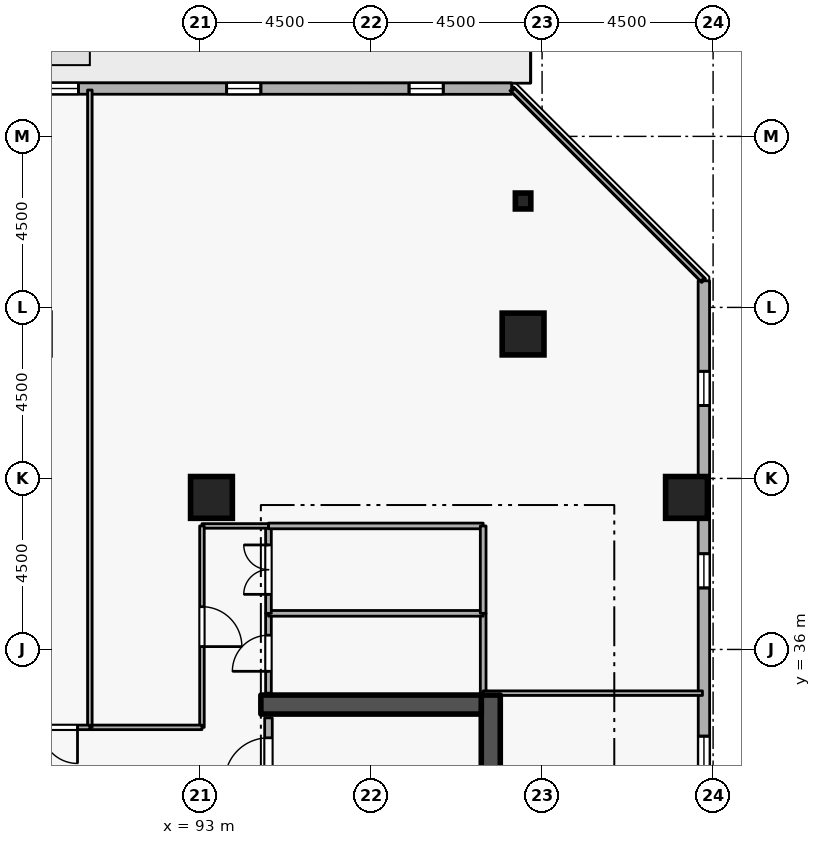
"""IFC4 building model, lengths in metres.
Left out: names, types, materials, properties, quantities, classifications, styles, units other than length and angle.
Written with IfcOpenShell. Run it as: python <this file> out.ifc"""

import sys

from ifc_helpers import new_model, si_unit, direction, frame, frame_2d, origin, origin_2d, place, context, subcontext, project, spatial, rectangle, i_section, extrude, element, fill, save


model = new_model("IFC4")
c1 = context("Model", 3, precision=1e-05, world=origin(), true_north=direction((0.0, 1.0)))
c2 = subcontext(c1, "Body", "Model", "MODEL_VIEW")
j1 = project(units=[si_unit("LENGTHUNIT", "METRE"), si_unit("PLANEANGLEUNIT", "RADIAN")], contexts=[c1])
p1 = place(None, origin())
s1 = spatial("IfcSite", under=j1, at=p1, CompositionType="ELEMENT")
p2 = place(p1, origin())
s2 = spatial("IfcBuilding", under=s1, at=p2, CompositionType="ELEMENT")
p3 = place(p2, frame((0.0, 0.0, 189.3)))
s3 = spatial("IfcBuildingStorey", under=s2, at=p3, CompositionType="ELEMENT", Elevation=189.3)
p4 = place(p3, frame((100.65, 19.2, 0.0), z_axis=(0.0, 0.0, 1.0), x_axis=(0.0, 1.0, 0.0)))
e1 = element("IfcWall", 1, at=p4, inside=s3, PredefinedType="SHEAR", context=c2, shape_type="SweptSolid", body=[
    extrude(rectangle(XDim=15.6, YDim=0.5, at=frame_2d((7.8, 0.0))), origin(), (0.0, 0.0, 1.0), 3.6),
])
p5 = place(p3, frame((94.6, 34.55, 0.0), z_axis=(0.0, 0.0, 1.0), x_axis=(1.0, 0.0, 0.0)))
e2 = element("IfcWall", 2, at=p5, inside=s3, PredefinedType="SHEAR", context=c2, shape_type="SweptSolid", body=[
    extrude(rectangle(XDim=5.8, YDim=0.5, at=frame_2d((2.9, 0.0))), origin(), (0.0, 0.0, 1.0), 3.6),
])
for number, where, z_axis, x_axis in (
    (3, (105.8, 40.0, 0.0), (0.0, 0.0, 1.0), (1.0, 0.0, 0.0)),
    (4, (101.5, 44.3, 0.0), (0.0, 0.0, 1.0), (1.0, 0.0, 0.0)),
    (5, (93.3, 40.0, 0.0), (0.0, 0.0, 1.0), (1.0, 0.0, 0.0)),
):
    element("IfcColumn", number, at=place(p3, frame(where, z_axis=z_axis, x_axis=x_axis)), inside=s3, PredefinedType="COLUMN", context=c2, shape_type="SweptSolid", body=[
        extrude(rectangle(XDim=1.1, YDim=1.1, at=origin_2d()), origin(), (0.0, 0.0, 1.0), 3.6),
    ])
p6 = place(p3, frame((101.5, 47.8, 0.0), z_axis=(0.0, 0.0, 1.0), x_axis=(1.0, 0.0, 0.0)))
e6 = element("IfcColumn", 6, at=p6, inside=s3, PredefinedType="COLUMN", context=c2, shape_type="SweptSolid", body=[
    extrude(i_section(OverallWidth=0.407, OverallDepth=0.419, WebThickness=0.031, FlangeThickness=0.049, FilletRadius=0.015, at=origin_2d()), origin(), (0.0, 0.0, 1.0), 3.6),
])
p7 = place(p3, frame((106.265, 11.819, 0.0), z_axis=(0.0, 0.0, 1.0), x_axis=(-0.000244999128, 0.999999969988, 0.0)))
e7 = element("IfcWall", 7, at=p7, inside=s3, PredefinedType="STANDARD", context=c2, shape_type="SweptSolid", body=[
    extrude(rectangle(XDim=33.881, YDim=0.3, at=frame_2d((16.94, 0.0))), origin(), (0.0, 0.0, 1.0), 2.7),
])
p8 = place(p7, frame((6.6, 0.0, 0.72)))
e8 = element("IfcOpeningElement", 8, at=p8, cuts=e7, PredefinedType="OPENING", context=c2, shape_type="SweptSolid", body=[
    extrude(rectangle(XDim=0.9, YDim=1.75, at=frame_2d((0.45, 0.875))), frame((0.0, 0.16, 0.0), z_axis=(0.0, -1.0, 0.0), x_axis=(1.0, 0.0, 0.0)), (0.0, 0.0, 1.0), 0.32),
])
p9 = place(p7, frame((11.4, 0.0, 0.72)))
e9 = element("IfcOpeningElement", 9, at=p9, cuts=e7, PredefinedType="OPENING", context=c2, shape_type="SweptSolid", body=[
    extrude(rectangle(XDim=0.9, YDim=1.75, at=frame_2d((0.45, 0.875))), frame((0.0, 0.16, 0.0), z_axis=(0.0, -1.0, 0.0), x_axis=(1.0, 0.0, 0.0)), (0.0, 0.0, 1.0), 0.32),
])
p10 = place(p7, frame((21.0, 0.0, 0.72)))
e10 = element("IfcOpeningElement", 10, at=p10, cuts=e7, PredefinedType="OPENING", context=c2, shape_type="SweptSolid", body=[
    extrude(rectangle(XDim=0.9, YDim=1.75, at=frame_2d((0.45, 0.875))), frame((0.0, 0.16, 0.0), z_axis=(0.0, -1.0, 0.0), x_axis=(1.0, 0.0, 0.0)), (0.0, 0.0, 1.0), 0.32),
])
p11 = place(p7, frame((25.8, 0.0, 0.72)))
e11 = element("IfcOpeningElement", 11, at=p11, cuts=e7, PredefinedType="OPENING", context=c2, shape_type="SweptSolid", body=[
    extrude(rectangle(XDim=0.9, YDim=1.75, at=frame_2d((0.45, 0.875))), frame((0.0, 0.16, 0.0), z_axis=(0.0, -1.0, 0.0), x_axis=(1.0, 0.0, 0.0)), (0.0, 0.0, 1.0), 0.32),
])
p12 = place(p7, frame((30.6, 0.0, 0.72)))
e12 = element("IfcOpeningElement", 12, at=p12, cuts=e7, PredefinedType="OPENING", context=c2, shape_type="SweptSolid", body=[
    extrude(rectangle(XDim=0.9, YDim=1.75, at=frame_2d((0.45, 0.875))), frame((0.0, 0.16, 0.0), z_axis=(0.0, -1.0, 0.0), x_axis=(1.0, 0.0, 0.0)), (0.0, 0.0, 1.0), 0.32),
])
p13 = place(p3, frame((101.199, 50.756, 0.0), z_axis=(0.0, 0.0, 1.0), x_axis=(-0.999999969988, 0.000244999128, 0.0)))
e13 = element("IfcWall", 13, at=p13, inside=s3, PredefinedType="STANDARD", context=c2, shape_type="SweptSolid", body=[
    extrude(rectangle(XDim=33.881, YDim=0.3, at=frame_2d((16.94, 0.0))), origin(), (0.0, 0.0, 1.0), 2.7),
])
p14 = place(p13, frame((18.74, 0.0, 0.0)))
e14 = element("IfcOpeningElement", 14, at=p14, cuts=e13, PredefinedType="OPENING", context=c2, shape_type="SweptSolid", body=[
    extrude(rectangle(XDim=1.0, YDim=2.08, at=frame_2d((0.5, 1.04))), frame((0.0, 0.16, 0.0), z_axis=(0.0, -1.0, 0.0), x_axis=(1.0, 0.0, 0.0)), (0.0, 0.0, 1.0), 0.32),
])
p15 = place(p13, frame((1.8, 0.0, 0.72)))
e15 = element("IfcOpeningElement", 15, at=p15, cuts=e13, PredefinedType="OPENING", context=c2, shape_type="SweptSolid", body=[
    extrude(rectangle(XDim=0.9, YDim=1.75, at=frame_2d((0.45, 0.875))), frame((0.0, 0.16, 0.0), z_axis=(0.0, -1.0, 0.0), x_axis=(1.0, 0.0, 0.0)), (0.0, 0.0, 1.0), 0.32),
])
p16 = place(p13, frame((6.6, 0.0, 0.72)))
e16 = element("IfcOpeningElement", 16, at=p16, cuts=e13, PredefinedType="OPENING", context=c2, shape_type="SweptSolid", body=[
    extrude(rectangle(XDim=0.9, YDim=1.75, at=frame_2d((0.45, 0.875))), frame((0.0, 0.16, 0.0), z_axis=(0.0, -1.0, 0.0), x_axis=(1.0, 0.0, 0.0)), (0.0, 0.0, 1.0), 0.32),
])
p17 = place(p13, frame((11.4, 0.0, 0.72)))
e17 = element("IfcOpeningElement", 17, at=p17, cuts=e13, PredefinedType="OPENING", context=c2, shape_type="SweptSolid", body=[
    extrude(rectangle(XDim=0.9, YDim=1.75, at=frame_2d((0.45, 0.875))), frame((0.0, 0.16, 0.0), z_axis=(0.0, -1.0, 0.0), x_axis=(1.0, 0.0, 0.0)), (0.0, 0.0, 1.0), 0.32),
])
p18 = place(p13, frame((16.2, 0.0, 0.72)))
e18 = element("IfcOpeningElement", 18, at=p18, cuts=e13, PredefinedType="OPENING", context=c2, shape_type="SweptSolid", body=[
    extrude(rectangle(XDim=0.9, YDim=1.75, at=frame_2d((0.45, 0.875))), frame((0.0, 0.16, 0.0), z_axis=(0.0, -1.0, 0.0), x_axis=(1.0, 0.0, 0.0)), (0.0, 0.0, 1.0), 0.32),
])
p19 = place(p13, frame((21.0, 0.0, 0.72)))
e19 = element("IfcOpeningElement", 19, at=p19, cuts=e13, PredefinedType="OPENING", context=c2, shape_type="SweptSolid", body=[
    extrude(rectangle(XDim=0.9, YDim=1.75, at=frame_2d((0.45, 0.875))), frame((0.0, 0.16, 0.0), z_axis=(0.0, -1.0, 0.0), x_axis=(1.0, 0.0, 0.0)), (0.0, 0.0, 1.0), 0.32),
])
p20 = place(p13, frame((25.8, 0.0, 0.72)))
e20 = element("IfcOpeningElement", 20, at=p20, cuts=e13, PredefinedType="OPENING", context=c2, shape_type="SweptSolid", body=[
    extrude(rectangle(XDim=0.9, YDim=1.75, at=frame_2d((0.45, 0.875))), frame((0.0, 0.16, 0.0), z_axis=(0.0, -1.0, 0.0), x_axis=(1.0, 0.0, 0.0)), (0.0, 0.0, 1.0), 0.32),
])
p21 = place(p13, frame((30.6, 0.0, 0.72)))
e21 = element("IfcOpeningElement", 21, at=p21, cuts=e13, PredefinedType="OPENING", context=c2, shape_type="SweptSolid", body=[
    extrude(rectangle(XDim=0.9, YDim=1.75, at=frame_2d((0.45, 0.875))), frame((0.0, 0.16, 0.0), z_axis=(0.0, -1.0, 0.0), x_axis=(1.0, 0.0, 0.0)), (0.0, 0.0, 1.0), 0.32),
])
p22 = place(p3, frame((94.8, 32.0, 0.0), z_axis=(0.0, 0.0, 1.0), x_axis=(0.0, 1.0, 0.0)))
e22 = element("IfcWall", 22, at=p22, inside=s3, PredefinedType="STANDARD", context=c2, shape_type="SweptSolid", body=[
    extrude(rectangle(XDim=2.2, YDim=0.2, at=frame_2d((1.1, 0.0))), origin(), (0.0, 0.0, 1.0), 3.34),
])
p23 = place(p22, frame((0.525, 0.0, 0.0)))
e23 = element("IfcOpeningElement", 23, at=p23, cuts=e22, PredefinedType="OPENING", context=c2, shape_type="SweptSolid", body=[
    extrude(rectangle(XDim=1.15, YDim=2.1, at=frame_2d((0.575, 1.05))), frame((0.0, 0.11, 0.0), z_axis=(0.0, -1.0, 0.0), x_axis=(1.0, 0.0, 0.0)), (0.0, 0.0, 1.0), 0.22),
])
p24 = place(p3, frame((100.45, 36.95, 0.0), z_axis=(0.0, 0.0, 1.0), x_axis=(0.0, -1.0, 0.0)))
e24 = element("IfcWall", 24, at=p24, inside=s3, PredefinedType="PARTITIONING", context=c2, shape_type="SweptSolid", body=[
    extrude(rectangle(XDim=2.1, YDim=0.15, at=frame_2d((1.05, 0.0))), origin(), (0.0, 0.0, 1.0), 3.34),
])
p25 = place(p3, frame((94.8, 34.85, 0.0), z_axis=(0.0, 0.0, 1.0), x_axis=(0.0, 1.0, 0.0)))
e25 = element("IfcWall", 25, at=p25, inside=s3, PredefinedType="PARTITIONING", context=c2, shape_type="SweptSolid", body=[
    extrude(rectangle(XDim=2.1, YDim=0.15, at=frame_2d((1.05, 0.0))), origin(), (0.0, 0.0, 1.0), 3.34),
])
p26 = place(p25, frame((0.575, 0.0, 0.0)))
e26 = element("IfcOpeningElement", 26, at=p26, cuts=e25, PredefinedType="OPENING", context=c2, shape_type="SweptSolid", body=[
    extrude(rectangle(XDim=0.95, YDim=2.1, at=frame_2d((0.475, 1.05))), frame((0.0, 0.085, 0.0), z_axis=(0.0, -1.0, 0.0), x_axis=(1.0, 0.0, 0.0)), (0.0, 0.0, 1.0), 0.17),
])
p27 = place(p3, frame((94.8, 36.95, 0.0), z_axis=(0.0, 0.0, 1.0), x_axis=(1.0, 0.0, 0.0)))
e27 = element("IfcWall", 27, at=p27, inside=s3, PredefinedType="PARTITIONING", context=c2, shape_type="SweptSolid", body=[
    extrude(rectangle(XDim=5.65, YDim=0.15, at=frame_2d((2.825, 0.0))), origin(), (0.0, 0.0, 1.0), 3.34),
])
p28 = place(p3, frame((94.8, 36.95, 0.0), z_axis=(0.0, 0.0, 1.0), x_axis=(0.0, 1.0, 0.0)))
e28 = element("IfcWall", 28, at=p28, inside=s3, PredefinedType="PARTITIONING", context=c2, shape_type="SweptSolid", body=[
    extrude(rectangle(XDim=2.3, YDim=0.15, at=frame_2d((1.15, 0.0))), origin(), (0.0, 0.0, 1.0), 3.34),
])
p29 = place(p28, frame((0.5, 0.0, 0.0)))
e29 = element("IfcOpeningElement", 29, at=p29, cuts=e28, PredefinedType="OPENING", context=c2, shape_type="SweptSolid", body=[
    extrude(rectangle(XDim=1.3, YDim=2.12, at=frame_2d((0.65, 1.06))), frame((0.0, 0.085, 0.0), z_axis=(0.0, -1.0, 0.0), x_axis=(1.0, 0.0, 0.0)), (0.0, 0.0, 1.0), 0.17),
])
p30 = place(p3, frame((94.8, 39.25, 0.0), z_axis=(0.0, 0.0, 1.0), x_axis=(1.0, 0.0, 0.0)))
e30 = element("IfcWall", 30, at=p30, inside=s3, PredefinedType="PARTITIONING", context=c2, shape_type="SweptSolid", body=[
    extrude(rectangle(XDim=5.65, YDim=0.15, at=frame_2d((2.825, 0.0))), origin(), (0.0, 0.0, 1.0), 3.34),
])
p31 = place(p3, frame((100.45, 39.25, 0.0), z_axis=(0.0, 0.0, 1.0), x_axis=(0.0, -1.0, 0.0)))
e31 = element("IfcWall", 31, at=p31, inside=s3, PredefinedType="PARTITIONING", context=c2, shape_type="SweptSolid", body=[
    extrude(rectangle(XDim=2.3, YDim=0.15, at=frame_2d((1.15, 0.0))), origin(), (0.0, 0.0, 1.0), 3.34),
])
p32 = place(p3, frame((94.8, 39.25, 0.0), z_axis=(0.0, 0.0, 1.0), x_axis=(-1.0, 0.0, 0.0)))
e32 = element("IfcWall", 32, at=p32, inside=s3, PredefinedType="PARTITIONING", context=c2, shape_type="SweptSolid", body=[
    extrude(rectangle(XDim=1.75, YDim=0.12, at=frame_2d((0.875, 0.0))), origin(), (0.0, 0.0, 1.0), 3.34),
])
p33 = place(p3, frame((93.05, 39.25, 0.0), z_axis=(0.0, 0.0, 1.0), x_axis=(0.0, -1.0, 0.0)))
e33 = element("IfcWall", 33, at=p33, inside=s3, PredefinedType="PARTITIONING", context=c2, shape_type="SweptSolid", body=[
    extrude(rectangle(XDim=5.3, YDim=0.12, at=frame_2d((2.65, 0.0))), origin(), (0.0, 0.0, 1.0), 3.34),
])
p34 = place(p33, frame((2.125, 0.0, 0.0)))
e34 = element("IfcOpeningElement", 34, at=p34, cuts=e33, PredefinedType="OPENING", context=c2, shape_type="SweptSolid", body=[
    extrude(rectangle(XDim=1.05, YDim=2.1, at=frame_2d((0.525, 1.05))), frame((0.0, 0.07, 0.0), z_axis=(0.0, -1.0, 0.0), x_axis=(1.0, 0.0, 0.0)), (0.0, 0.0, 1.0), 0.14),
])
p35 = place(p3, frame((93.05, 33.95, 0.0), z_axis=(0.0, 0.0, 1.0), x_axis=(-1.0, 0.0, 0.0)))
e35 = element("IfcWall", 35, at=p35, inside=s3, PredefinedType="PARTITIONING", context=c2, shape_type="SweptSolid", body=[
    extrude(rectangle(XDim=2.95, YDim=0.12, at=frame_2d((1.475, 0.0))), origin(), (0.0, 0.0, 1.0), 3.34),
])
p36 = place(p3, frame((90.1, 33.95, 0.0), z_axis=(0.0, 0.0, 1.0), x_axis=(0.0, 1.0, 0.0)))
e36 = element("IfcWall", 36, at=p36, inside=s3, PredefinedType="PARTITIONING", context=c2, shape_type="SweptSolid", body=[
    extrude(rectangle(XDim=16.77, YDim=0.12, at=frame_2d((8.385, 0.0))), origin(), (0.0, 0.0, 1.0), 3.34),
])
p37 = place(p3, frame((101.233, 50.72, 0.0), z_axis=(0.0, 0.0, 1.0), x_axis=(0.707106781187, -0.707106781187, 0.0)))
e37 = element("IfcWall", 37, at=p37, inside=s3, PredefinedType="PARTITIONING", context=c2, shape_type="SweptSolid", body=[
    extrude(rectangle(XDim=7.052, YDim=0.12, at=frame_2d((3.526, 0.0))), origin(), (0.0, 0.0, 1.0), 3.34),
])
p38 = place(p3, frame((106.22, 34.85, 0.0), z_axis=(0.0, 0.0, 1.0), x_axis=(-1.0, 0.0, 0.0)))
e38 = element("IfcWall", 38, at=p38, inside=s3, PredefinedType="PARTITIONING", context=c2, shape_type="SweptSolid", body=[
    extrude(rectangle(XDim=5.77, YDim=0.12, at=frame_2d((2.885, 0.0))), origin(), (0.0, 0.0, 1.0), 2.545),
])
p39 = place(p3, frame((90.1, 33.95, 0.0), z_axis=(0.0, 0.0, 1.0), x_axis=(-1.0, 0.0, 0.0)))
e39 = element("IfcWall", 39, at=p39, inside=s3, PredefinedType="PARTITIONING", context=c2, shape_type="SweptSolid", body=[
    extrude(rectangle(XDim=1.6, YDim=0.12, at=frame_2d((0.8, 0.0))), origin(), (0.0, 0.0, 1.0), 3.34),
])
p40 = place(p39, frame((0.325, 0.0, 0.0)))
e40 = element("IfcOpeningElement", 40, at=p40, cuts=e39, PredefinedType="OPENING", context=c2, shape_type="SweptSolid", body=[
    extrude(rectangle(XDim=0.95, YDim=2.1, at=frame_2d((0.475, 1.05))), frame((0.0, 0.07, 0.0), z_axis=(0.0, -1.0, 0.0), x_axis=(1.0, 0.0, 0.0)), (0.0, 0.0, 1.0), 0.14),
])
p41 = place(p10, origin())
e41 = element("IfcWindow", 41, at=p41, inside=s3, PartitioningType="SINGLE_PANEL", PredefinedType="WINDOW", context=c2, shape_type="SweptSolid", body=[
    extrude(rectangle(XDim=0.9, YDim=1.75, at=frame_2d((0.45, 0.875))), frame((0.0, 0.03, 0.0), z_axis=(0.0, -1.0, 0.0), x_axis=(1.0, 0.0, 0.0)), (0.0, 0.0, 1.0), 0.06),
])
fill(e10, e41)
p42 = place(p11, origin())
e42 = element("IfcWindow", 42, at=p42, inside=s3, PartitioningType="SINGLE_PANEL", PredefinedType="WINDOW", context=c2, shape_type="SweptSolid", body=[
    extrude(rectangle(XDim=0.9, YDim=1.75, at=frame_2d((0.45, 0.875))), frame((0.0, 0.03, 0.0), z_axis=(0.0, -1.0, 0.0), x_axis=(1.0, 0.0, 0.0)), (0.0, 0.0, 1.0), 0.06),
])
fill(e11, e42)
p43 = place(p12, origin())
e43 = element("IfcWindow", 43, at=p43, inside=s3, PartitioningType="SINGLE_PANEL", PredefinedType="WINDOW", context=c2, shape_type="SweptSolid", body=[
    extrude(rectangle(XDim=0.9, YDim=1.75, at=frame_2d((0.45, 0.875))), frame((0.0, 0.03, 0.0), z_axis=(0.0, -1.0, 0.0), x_axis=(1.0, 0.0, 0.0)), (0.0, 0.0, 1.0), 0.06),
])
fill(e12, e43)
p44 = place(p15, origin())
e44 = element("IfcWindow", 44, at=p44, inside=s3, PartitioningType="SINGLE_PANEL", PredefinedType="WINDOW", context=c2, shape_type="SweptSolid", body=[
    extrude(rectangle(XDim=0.9, YDim=1.75, at=frame_2d((0.45, 0.875))), frame((0.0, 0.03, 0.0), z_axis=(0.0, -1.0, 0.0), x_axis=(1.0, 0.0, 0.0)), (0.0, 0.0, 1.0), 0.06),
])
fill(e15, e44)
p45 = place(p16, origin())
e45 = element("IfcWindow", 45, at=p45, inside=s3, PartitioningType="SINGLE_PANEL", PredefinedType="WINDOW", context=c2, shape_type="SweptSolid", body=[
    extrude(rectangle(XDim=0.9, YDim=1.75, at=frame_2d((0.45, 0.875))), frame((0.0, 0.03, 0.0), z_axis=(0.0, -1.0, 0.0), x_axis=(1.0, 0.0, 0.0)), (0.0, 0.0, 1.0), 0.06),
])
fill(e16, e45)
p46 = place(p17, origin())
e46 = element("IfcWindow", 46, at=p46, inside=s3, PartitioningType="SINGLE_PANEL", PredefinedType="WINDOW", context=c2, shape_type="SweptSolid", body=[
    extrude(rectangle(XDim=0.9, YDim=1.75, at=frame_2d((0.45, 0.875))), frame((0.0, 0.03, 0.0), z_axis=(0.0, -1.0, 0.0), x_axis=(1.0, 0.0, 0.0)), (0.0, 0.0, 1.0), 0.06),
])
fill(e17, e46)
p47 = place(p23, origin())
e47 = element("IfcDoor", 47, at=p47, inside=s3, OperationType="SINGLE_SWING_LEFT", PredefinedType="DOOR", context=c2, shape_type="SweptSolid", body=[
    extrude(rectangle(XDim=1.15, YDim=2.1, at=frame_2d((0.575, 1.05))), frame((0.0, 0.025, 0.0), z_axis=(0.0, -1.0, 0.0), x_axis=(1.0, 0.0, 0.0)), (0.0, 0.0, 1.0), 0.05),
])
fill(e23, e47)
p48 = place(p26, origin())
e48 = element("IfcDoor", 48, at=p48, inside=s3, OperationType="SINGLE_SWING_LEFT", PredefinedType="DOOR", context=c2, shape_type="SweptSolid", body=[
    extrude(rectangle(XDim=0.95, YDim=2.1, at=frame_2d((0.475, 1.05))), frame((0.0, 0.025, 0.0), z_axis=(0.0, -1.0, 0.0), x_axis=(1.0, 0.0, 0.0)), (0.0, 0.0, 1.0), 0.05),
])
fill(e26, e48)
p49 = place(p29, origin())
e49 = element("IfcDoor", 49, at=p49, inside=s3, OperationType="DOUBLE_DOOR_SINGLE_SWING", PredefinedType="DOOR", context=c2, shape_type="SweptSolid", body=[
    extrude(rectangle(XDim=1.3, YDim=2.12, at=frame_2d((0.65, 1.06))), frame((0.0, 0.025, 0.0), z_axis=(0.0, -1.0, 0.0), x_axis=(1.0, 0.0, 0.0)), (0.0, 0.0, 1.0), 0.05),
])
fill(e29, e49)
p50 = place(p34, origin())
e50 = element("IfcDoor", 50, at=p50, inside=s3, OperationType="SINGLE_SWING_RIGHT", PredefinedType="DOOR", context=c2, shape_type="SweptSolid", body=[
    extrude(rectangle(XDim=1.05, YDim=2.1, at=frame_2d((0.525, 1.05))), frame((0.0, 0.025, 0.0), z_axis=(0.0, -1.0, 0.0), x_axis=(1.0, 0.0, 0.0)), (0.0, 0.0, 1.0), 0.05),
])
fill(e34, e50)
p51 = place(p40, origin())
e51 = element("IfcDoor", 51, at=p51, inside=s3, OperationType="SINGLE_SWING_LEFT", PredefinedType="DOOR", context=c2, shape_type="SweptSolid", body=[
    extrude(rectangle(XDim=0.95, YDim=2.1, at=frame_2d((0.475, 1.05))), frame((0.0, 0.025, 0.0), z_axis=(0.0, -1.0, 0.0), x_axis=(1.0, 0.0, 0.0)), (0.0, 0.0, 1.0), 0.05),
])
fill(e40, e51)
save(model, sys.argv[1])
